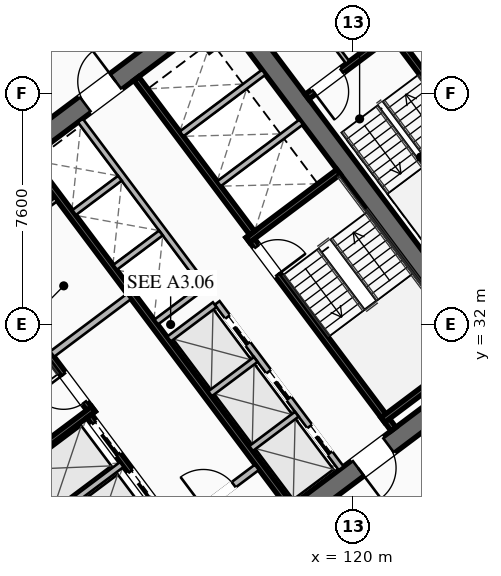
"""IFC4 building model, lengths in metres.
Left out: names, types, materials, properties, quantities, classifications, styles, units other than length and angle.
Written with IfcOpenShell. Run it as: python <this file> out.ifc"""

import sys

from ifc_helpers import new_model, si_unit, direction, frame, frame_2d, origin, place, context, subcontext, project, spatial, rectangle, extrude, element, fill, save


model = new_model("IFC4")
c1 = context("Model", 3, precision=1e-05, world=origin(), true_north=direction((0.0, 1.0)))
c2 = subcontext(c1, "Body", "Model", "MODEL_VIEW")
j1 = project(units=[si_unit("LENGTHUNIT", "METRE"), si_unit("PLANEANGLEUNIT", "RADIAN")], contexts=[c1])
p1 = place(None, origin())
s1 = spatial("IfcSite", under=j1, at=p1, CompositionType="ELEMENT")
p2 = place(p1, origin())
s2 = spatial("IfcBuilding", under=s1, at=p2, CompositionType="ELEMENT")
p3 = place(p2, frame((0.0, 0.0, 63.65)))
s3 = spatial("IfcBuildingStorey", under=s2, at=p3, CompositionType="ELEMENT", Elevation=63.65)
for number, where, z_axis, x_axis in (
    (1, (112.476, 21.107, 0.0), (0.0, 0.0, 1.0), (-0.6, 0.8, 0.0)),
    (2, (115.524, 42.893, 0.0), (0.0, 0.0, 1.0), (0.6, -0.8, 0.0)),
):
    element("IfcWall", number, at=place(p3, frame(where, z_axis=z_axis, x_axis=x_axis)), inside=s3, PredefinedType="SHEAR", context=c2, shape_type="SweptSolid", body=[
        extrude(rectangle(XDim=15.6, YDim=0.65, at=frame_2d((7.8, 0.0))), origin(), (0.0, 0.0, 1.0), 3.55),
    ])
p4 = place(p3, frame((124.429, 30.478, 0.0), z_axis=(0.0, 0.0, 1.0), x_axis=(-0.799998028465, -0.600002628705, 0.0)))
e3 = element("IfcWall", 3, at=p4, inside=s3, PredefinedType="SHEAR", context=c2, shape_type="SweptSolid", body=[
    extrude(rectangle(XDim=14.86, YDim=0.65, at=frame_2d((7.43, 0.0))), origin(), (0.0, 0.0, 1.0), 3.55),
])
p5 = place(p4, frame((9.13, 0.0, 0.0)))
e4 = element("IfcOpeningElement", 4, at=p5, cuts=e3, PredefinedType="OPENING", context=c2, shape_type="SweptSolid", body=[
    extrude(rectangle(XDim=1.25, YDim=2.25, at=frame_2d((0.625, 1.125))), frame((0.0, 0.335, 0.0), z_axis=(0.0, -1.0, 0.0), x_axis=(1.0, 0.0, 0.0)), (0.0, 0.0, 1.0), 0.67),
])
p6 = place(p4, frame((4.08, 0.0, 0.0)))
e5 = element("IfcOpeningElement", 5, at=p6, cuts=e3, PredefinedType="OPENING", context=c2, shape_type="SweptSolid", body=[
    extrude(rectangle(XDim=1.25, YDim=2.25, at=frame_2d((0.625, 1.125))), frame((0.0, 0.335, 0.0), z_axis=(0.0, -1.0, 0.0), x_axis=(1.0, 0.0, 0.0)), (0.0, 0.0, 1.0), 0.67),
])
p7 = place(p3, frame((103.571, 33.522, 0.0), z_axis=(0.0, 0.0, 1.0), x_axis=(0.799998028465, 0.600002628705, 0.0)))
e6 = element("IfcWall", 6, at=p7, inside=s3, PredefinedType="SHEAR", context=c2, shape_type="SweptSolid", body=[
    extrude(rectangle(XDim=14.86, YDim=0.65, at=frame_2d((7.43, 0.0))), origin(), (0.0, 0.0, 1.0), 3.55),
])
p8 = place(p7, frame((4.48, 0.0, 0.0)))
e7 = element("IfcOpeningElement", 7, at=p8, cuts=e6, PredefinedType="OPENING", context=c2, shape_type="SweptSolid", body=[
    extrude(rectangle(XDim=1.25, YDim=2.25, at=frame_2d((0.625, 1.125))), frame((0.0, 0.335, 0.0), z_axis=(0.0, -1.0, 0.0), x_axis=(1.0, 0.0, 0.0)), (0.0, 0.0, 1.0), 0.67),
])
p9 = place(p7, frame((9.53, 0.0, 0.0)))
e8 = element("IfcOpeningElement", 8, at=p9, cuts=e6, PredefinedType="OPENING", context=c2, shape_type="SweptSolid", body=[
    extrude(rectangle(XDim=1.25, YDim=2.25, at=frame_2d((0.625, 1.125))), frame((0.0, 0.335, 0.0), z_axis=(0.0, -1.0, 0.0), x_axis=(1.0, 0.0, 0.0)), (0.0, 0.0, 1.0), 0.67),
])
p10 = place(p3, frame((111.44, 29.08, 0.0), z_axis=(0.0, 0.0, 1.0), x_axis=(-0.600009827119, 0.799992629566, 0.0)))
e9 = element("IfcWall", 9, at=p10, inside=s3, PredefinedType="SHEAR", context=c2, shape_type="SweptSolid", body=[
    extrude(rectangle(XDim=7.95, YDim=0.2, at=frame_2d((3.975, 0.0))), origin(), (0.0, 0.0, 1.0), 3.35),
])
p11 = place(p10, frame((0.45, 0.0, 0.0)))
e10 = element("IfcOpeningElement", 10, at=p11, cuts=e9, PredefinedType="OPENING", context=c2, shape_type="SweptSolid", body=[
    extrude(rectangle(XDim=1.15, YDim=2.2, at=frame_2d((0.575, 1.1))), frame((0.0, 0.11, 0.0), z_axis=(0.0, -1.0, 0.0), x_axis=(1.0, 0.0, 0.0)), (0.0, 0.0, 1.0), 0.22),
])
p12 = place(p3, frame((108.476, 26.982, 0.0), z_axis=(0.0, 0.0, 1.0), x_axis=(0.799984290658, 0.600020945218, 0.0)))
e11 = element("IfcWall", 11, at=p12, inside=s3, PredefinedType="SHEAR", context=c2, shape_type="SweptSolid", body=[
    extrude(rectangle(XDim=3.73, YDim=0.2, at=frame_2d((1.865, 0.0))), origin(), (0.0, 0.0, 1.0), 3.35),
])
p13 = place(p3, frame((116.56, 34.92, 0.0), z_axis=(0.0, 0.0, 1.0), x_axis=(0.600009827119, -0.799992629566, 0.0)))
e12 = element("IfcWall", 12, at=p13, inside=s3, PredefinedType="SHEAR", context=c2, shape_type="SweptSolid", body=[
    extrude(rectangle(XDim=7.95, YDim=0.2, at=frame_2d((3.975, 0.0))), origin(), (0.0, 0.0, 1.0), 3.35),
])
p14 = place(p13, frame((0.45, 0.0, 0.0)))
e13 = element("IfcOpeningElement", 13, at=p14, cuts=e12, PredefinedType="OPENING", context=c2, shape_type="SweptSolid", body=[
    extrude(rectangle(XDim=1.15, YDim=2.2, at=frame_2d((0.575, 1.1))), frame((0.0, 0.11, 0.0), z_axis=(0.0, -1.0, 0.0), x_axis=(1.0, 0.0, 0.0)), (0.0, 0.0, 1.0), 0.22),
])
for number, where, z_axis, x_axis in (
    (14, (116.54, 34.78, 0.0), (0.0, 0.0, 1.0), (0.8, 0.6, 0.0)),
    (15, (120.98, 28.86, 0.0), (0.0, 0.0, 1.0), (0.8, 0.6, 0.0)),
):
    element("IfcWall", number, at=place(p3, frame(where, z_axis=z_axis, x_axis=x_axis)), inside=s3, PredefinedType="SHEAR", context=c2, shape_type="SweptSolid", body=[
        extrude(rectangle(XDim=3.73, YDim=0.2, at=frame_2d((1.865, 0.0))), origin(), (0.0, 0.0, 1.0), 3.35),
    ])
p15 = place(p3, frame((117.938, 26.016, 0.0), z_axis=(0.0, 0.0, 1.0), x_axis=(-0.600005463273, 0.799995902516, 0.0)))
e16 = element("IfcWall", 16, at=p15, inside=s3, PredefinedType="SHEAR", context=c2, shape_type="SweptSolid", body=[
    extrude(rectangle(XDim=14.3, YDim=0.2, at=frame_2d((7.15, 0.0))), origin(), (0.0, 0.0, 1.0), 3.35),
])
p16 = place(p3, frame((110.104, 31.028, 0.0), z_axis=(0.0, 0.0, 1.0), x_axis=(0.800018601094, 0.59997519774, 0.0)))
e17 = element("IfcWall", 17, at=p16, inside=s3, PredefinedType="SOLIDWALL", context=c2, shape_type="SweptSolid", body=[
    extrude(rectangle(XDim=3.15, YDim=0.22, at=frame_2d((1.575, 0.0))), origin(), (0.0, 0.0, 1.0), 2.493),
])
p17 = place(p3, frame((114.316, 25.412, 0.0), z_axis=(0.0, 0.0, 1.0), x_axis=(0.800018601094, 0.59997519774, 0.0)))
e18 = element("IfcWall", 18, at=p17, inside=s3, PredefinedType="SOLIDWALL", context=c2, shape_type="SweptSolid", body=[
    extrude(rectangle(XDim=3.15, YDim=0.22, at=frame_2d((1.575, 0.0))), origin(), (0.0, 0.0, 1.0), 2.493),
])
p18 = place(p17, frame((0.95, 0.0, 0.0)))
e19 = element("IfcOpeningElement", 19, at=p18, cuts=e18, PredefinedType="OPENING", context=c2, shape_type="SweptSolid", body=[
    extrude(rectangle(XDim=1.25, YDim=2.25, at=frame_2d((0.625, 1.125))), frame((0.0, 0.12, 0.0), z_axis=(0.0, -1.0, 0.0), x_axis=(1.0, 0.0, 0.0)), (0.0, 0.0, 1.0), 0.24),
])
p19 = place(p3, frame((115.13, 23.91, 0.0), z_axis=(0.0, 0.0, 1.0), x_axis=(-0.599975393228, 0.800018454488, 0.0)))
e20 = element("IfcWall", 20, at=p19, inside=s3, PredefinedType="SHEAR", context=c2, shape_type="SweptSolid", body=[
    extrude(rectangle(XDim=6.35, YDim=0.2, at=frame_2d((3.175, 0.0))), origin(), (0.0, 0.0, 1.0), 3.35),
])
p20 = place(p19, frame((4.775, 0.0, 0.0)))
e21 = element("IfcOpeningElement", 21, at=p20, cuts=e20, PredefinedType="OPENING", context=c2, shape_type="SweptSolid", body=[
    extrude(rectangle(XDim=1.3, YDim=2.25, at=frame_2d((0.65, 1.125))), frame((0.0, 0.11, 0.0), z_axis=(0.0, -1.0, 0.0), x_axis=(1.0, 0.0, 0.0)), (0.0, 0.0, 1.0), 0.22),
])
p21 = place(p19, frame((2.775, 0.0, 0.0)))
e22 = element("IfcOpeningElement", 22, at=p21, cuts=e20, PredefinedType="OPENING", context=c2, shape_type="SweptSolid", body=[
    extrude(rectangle(XDim=1.3, YDim=2.25, at=frame_2d((0.65, 1.125))), frame((0.0, 0.11, 0.0), z_axis=(0.0, -1.0, 0.0), x_axis=(1.0, 0.0, 0.0)), (0.0, 0.0, 1.0), 0.22),
])
p22 = place(p19, frame((0.575, 0.0, 0.0)))
e23 = element("IfcOpeningElement", 23, at=p22, cuts=e20, PredefinedType="OPENING", context=c2, shape_type="SweptSolid", body=[
    extrude(rectangle(XDim=1.3, YDim=2.25, at=frame_2d((0.65, 1.125))), frame((0.0, 0.11, 0.0), z_axis=(0.0, -1.0, 0.0), x_axis=(1.0, 0.0, 0.0)), (0.0, 0.0, 1.0), 0.22),
])
p23 = place(p3, frame((109.688, 25.366, 0.0), z_axis=(0.0, 0.0, 1.0), x_axis=(0.8, 0.6, 0.0)))
e24 = element("IfcWall", 24, at=p23, inside=s3, PredefinedType="SOLIDWALL", context=c2, shape_type="SweptSolid", body=[
    extrude(rectangle(XDim=3.38, YDim=0.2, at=frame_2d((1.69, 0.0))), origin(), (0.0, 0.0, 1.0), 3.35),
])
p24 = place(p3, frame((112.87, 40.09, 0.0), z_axis=(0.0, 0.0, 1.0), x_axis=(0.599975393228, -0.800018454488, 0.0)))
e25 = element("IfcWall", 25, at=p24, inside=s3, PredefinedType="SHEAR", context=c2, shape_type="SweptSolid", body=[
    extrude(rectangle(XDim=6.35, YDim=0.2, at=frame_2d((3.175, 0.0))), origin(), (0.0, 0.0, 1.0), 3.35),
])
for number, where, z_axis, x_axis in (
    (26, (115.59, 36.63, 0.0), (0.0, 0.0, 1.0), (0.8, 0.6, 0.0)),
    (27, (114.36, 38.27, 0.0), (0.0, 0.0, 1.0), (0.8, 0.6, 0.0)),
):
    element("IfcWall", number, at=place(p3, frame(where, z_axis=z_axis, x_axis=x_axis)), inside=s3, PredefinedType="SOLIDWALL", context=c2, shape_type="SweptSolid", body=[
        extrude(rectangle(XDim=3.38, YDim=0.2, at=frame_2d((1.69, 0.0))), origin(), (0.0, 0.0, 1.0), 3.35),
    ])
p25 = place(p3, frame((107.71, 34.22, 0.0), z_axis=(0.0, 0.0, 1.0), x_axis=(0.799981399002, 0.60002480053, 0.0)))
e28 = element("IfcWall", 28, at=p25, inside=s3, PredefinedType="PARTITIONING", context=c2, shape_type="SweptSolid", body=[
    extrude(rectangle(XDim=3.15, YDim=0.135, at=frame_2d((1.575, 0.0))), origin(), (0.0, 0.0, 1.0), 2.493),
])
p26 = place(p25, frame((1.05, 0.0, 0.0)))
e29 = element("IfcOpeningElement", 29, at=p26, cuts=e28, PredefinedType="OPENING", context=c2, shape_type="SweptSolid", body=[
    extrude(rectangle(XDim=1.05, YDim=2.2, at=frame_2d((0.525, 1.1))), frame((0.0, 0.077, 0.0), z_axis=(0.0, -1.0, 0.0), x_axis=(1.0, 0.0, 0.0)), (0.0, 0.0, 1.0), 0.155),
])
p27 = place(p3, frame((119.61, 27.27, 0.0), z_axis=(0.0, 0.0, 1.0), x_axis=(-0.600011488909, 0.79999138319, 0.0)))
e30 = element("IfcWall", 30, at=p27, inside=s3, PredefinedType="SOLIDWALL", context=c2, shape_type="SweptSolid", body=[
    extrude(rectangle(XDim=6.8, YDim=0.2, at=frame_2d((3.4, 0.0))), origin(), (0.0, 0.0, 1.0), 3.35),
])
p28 = place(p27, frame((0.625, 0.0, 0.0)))
e31 = element("IfcOpeningElement", 31, at=p28, cuts=e30, PredefinedType="OPENING", context=c2, shape_type="SweptSolid", body=[
    extrude(rectangle(XDim=1.1, YDim=2.2, at=frame_2d((0.55, 1.1))), frame((0.0, 0.11, 0.0), z_axis=(0.0, -1.0, 0.0), x_axis=(1.0, 0.0, 0.0)), (0.0, 0.0, 1.0), 0.22),
])
p29 = place(p27, frame((2.875, 0.0, 0.0)))
e32 = element("IfcOpeningElement", 32, at=p29, cuts=e30, PredefinedType="OPENING", context=c2, shape_type="SweptSolid", body=[
    extrude(rectangle(XDim=1.1, YDim=2.2, at=frame_2d((0.55, 1.1))), frame((0.0, 0.11, 0.0), z_axis=(0.0, -1.0, 0.0), x_axis=(1.0, 0.0, 0.0)), (0.0, 0.0, 1.0), 0.22),
])
p30 = place(p27, frame((5.125, 0.0, 0.0)))
e33 = element("IfcOpeningElement", 33, at=p30, cuts=e30, PredefinedType="OPENING", context=c2, shape_type="SweptSolid", body=[
    extrude(rectangle(XDim=1.1, YDim=2.2, at=frame_2d((0.55, 1.1))), frame((0.0, 0.11, 0.0), z_axis=(0.0, -1.0, 0.0), x_axis=(1.0, 0.0, 0.0)), (0.0, 0.0, 1.0), 0.22),
])
p31 = place(p3, frame((116.646, 27.922, 0.0), z_axis=(0.0, 0.0, 1.0), x_axis=(0.8, 0.6, 0.0)))
e34 = element("IfcWall", 34, at=p31, inside=s3, PredefinedType="SOLIDWALL", context=c2, shape_type="SweptSolid", body=[
    extrude(rectangle(XDim=1.88, YDim=0.2, at=frame_2d((0.94, 0.0))), origin(), (0.0, 0.0, 1.0), 3.35),
])
p32 = place(p3, frame((115.296, 29.722, 0.0), z_axis=(0.0, 0.0, 1.0), x_axis=(0.799984418148, 0.600020775241, 0.0)))
e35 = element("IfcWall", 35, at=p32, inside=s3, PredefinedType="SOLIDWALL", context=c2, shape_type="SweptSolid", body=[
    extrude(rectangle(XDim=1.88, YDim=0.2, at=frame_2d((0.94, 0.0))), origin(), (0.0, 0.0, 1.0), 3.35),
])
p33 = place(p3, frame((113.946, 31.522, 0.0), z_axis=(0.0, 0.0, 1.0), x_axis=(0.8, 0.6, 0.0)))
e36 = element("IfcWall", 36, at=p33, inside=s3, PredefinedType="SOLIDWALL", context=c2, shape_type="SweptSolid", body=[
    extrude(rectangle(XDim=1.88, YDim=0.2, at=frame_2d((0.94, 0.0))), origin(), (0.0, 0.0, 1.0), 3.35),
])
p34 = place(p3, frame((115.11, 33.27, 0.0), z_axis=(0.0, 0.0, 1.0), x_axis=(-0.600011488909, 0.79999138319, 0.0)))
e37 = element("IfcWall", 37, at=p34, inside=s3, PredefinedType="SOLIDWALL", context=c2, shape_type="SweptSolid", body=[
    extrude(rectangle(XDim=6.8, YDim=0.2, at=frame_2d((3.4, 0.0))), origin(), (0.0, 0.0, 1.0), 3.35),
])
p35 = place(p3, frame((113.526, 32.082, 0.0), z_axis=(0.0, 0.0, 1.0), x_axis=(0.800046745961, 0.599937666993, 0.0)))
e38 = element("IfcWall", 38, at=p35, inside=s3, PredefinedType="SOLIDWALL", context=c2, shape_type="SweptSolid", body=[
    extrude(rectangle(XDim=1.88, YDim=0.2, at=frame_2d((0.94, 0.0))), origin(), (0.0, 0.0, 1.0), 3.35),
])
p36 = place(p3, frame((112.176, 33.882, 0.0), z_axis=(0.0, 0.0, 1.0), x_axis=(0.8, 0.6, 0.0)))
e39 = element("IfcWall", 39, at=p36, inside=s3, PredefinedType="SOLIDWALL", context=c2, shape_type="SweptSolid", body=[
    extrude(rectangle(XDim=1.88, YDim=0.2, at=frame_2d((0.94, 0.0))), origin(), (0.0, 0.0, 1.0), 3.35),
])
p37 = place(p3, frame((110.826, 35.682, 0.0), z_axis=(0.0, 0.0, 1.0), x_axis=(0.799984418148, 0.600020775241, 0.0)))
e40 = element("IfcWall", 40, at=p37, inside=s3, PredefinedType="SOLIDWALL", context=c2, shape_type="SweptSolid", body=[
    extrude(rectangle(XDim=1.88, YDim=0.2, at=frame_2d((0.94, 0.0))), origin(), (0.0, 0.0, 1.0), 3.35),
])
p38 = place(p3, frame((125.304, 36.228, 0.0), z_axis=(0.0, 0.0, 1.0), x_axis=(-0.59998851072, 0.800008616831, 0.0)))
e41 = element("IfcWall", 41, at=p38, inside=s3, PredefinedType="SHEAR", context=c2, shape_type="SweptSolid", body=[
    extrude(rectangle(XDim=6.8, YDim=0.2, at=frame_2d((3.4, 0.0))), origin(), (0.0, 0.0, 1.0), 3.35),
])
p39 = place(p3, frame((121.204, 41.528, 0.0), z_axis=(0.0, 0.0, 1.0), x_axis=(-0.800017232136, -0.599977023131, 0.0)))
e42 = element("IfcWall", 42, at=p39, inside=s3, PredefinedType="SHEAR", context=c2, shape_type="SweptSolid", body=[
    extrude(rectangle(XDim=3.4, YDim=0.2, at=frame_2d((1.7, 0.0))), origin(), (0.0, 0.0, 1.0), 3.35),
])
p40 = place(p39, frame((1.975, 0.0, 0.0)))
e43 = element("IfcOpeningElement", 43, at=p40, cuts=e42, PredefinedType="OPENING", context=c2, shape_type="SweptSolid", body=[
    extrude(rectangle(XDim=1.15, YDim=2.2, at=frame_2d((0.575, 1.1))), frame((0.0, 0.11, 0.0), z_axis=(0.0, -1.0, 0.0), x_axis=(1.0, 0.0, 0.0)), (0.0, 0.0, 1.0), 0.22),
])
p41 = place(p3, frame((119.824, 40.618, 0.0), z_axis=(0.0, 0.0, 1.0), x_axis=(-0.599982243973, 0.800013316712, 0.0)))
e44 = element("IfcWall", 44, at=p41, inside=s3, PredefinedType="PARTITIONING", context=c2, shape_type="SweptSolid", body=[
    extrude(rectangle(XDim=4.4, YDim=0.135, at=frame_2d((2.2, 0.0))), origin(), (0.0, 0.0, 1.0), 2.493),
])
p42 = place(p3, frame((98.516, 34.012, 0.0), z_axis=(0.0, 0.0, 1.0), x_axis=(0.799998035726, 0.600002619023, 0.0)))
e45 = element("IfcWall", 45, at=p42, inside=s3, PredefinedType="PARTITIONING", context=c2, shape_type="SweptSolid", body=[
    extrude(rectangle(XDim=29.83, YDim=0.135, at=frame_2d((14.915, 0.0))), origin(), (0.0, 0.0, 1.0), 2.493),
])
p43 = place(p42, frame((1.587, 0.0, 0.0)))
e46 = element("IfcOpeningElement", 46, at=p43, cuts=e45, PredefinedType="OPENING", context=c2, shape_type="SweptSolid", body=[
    extrude(rectangle(XDim=0.95, YDim=2.05, at=frame_2d((0.475, 1.025))), frame((0.0, 0.077, 0.0), z_axis=(0.0, -1.0, 0.0), x_axis=(1.0, 0.0, 0.0)), (0.0, 0.0, 1.0), 0.155),
])
p44 = place(p42, frame((28.58, 0.0, 0.0)))
e47 = element("IfcOpeningElement", 47, at=p44, cuts=e45, PredefinedType="OPENING", context=c2, shape_type="SweptSolid", body=[
    extrude(rectangle(XDim=0.95, YDim=2.05, at=frame_2d((0.475, 1.025))), frame((0.0, 0.077, 0.0), z_axis=(0.0, -1.0, 0.0), x_axis=(1.0, 0.0, 0.0)), (0.0, 0.0, 1.0), 0.155),
])
p45 = place(p3, frame((135.46, 34.47, 0.0), z_axis=(0.0, 0.0, 1.0), x_axis=(-0.800000982127, -0.599998690494, 0.0)))
e48 = element("IfcWall", 48, at=p45, inside=s3, PredefinedType="PARTITIONING", context=c2, shape_type="SweptSolid", body=[
    extrude(rectangle(XDim=29.83, YDim=0.135, at=frame_2d((14.915, 0.0))), origin(), (0.0, 0.0, 1.0), 2.493),
])
p46 = place(p45, frame((27.431, 0.0, 0.0)))
e49 = element("IfcOpeningElement", 49, at=p46, cuts=e48, PredefinedType="OPENING", context=c2, shape_type="SweptSolid", body=[
    extrude(rectangle(XDim=0.95, YDim=2.05, at=frame_2d((0.475, 1.025))), frame((0.0, 0.077, 0.0), z_axis=(0.0, -1.0, 0.0), x_axis=(1.0, 0.0, 0.0)), (0.0, 0.0, 1.0), 0.155),
])
p47 = place(p45, frame((18.43, 0.0, 0.0)))
e50 = element("IfcOpeningElement", 50, at=p47, cuts=e48, PredefinedType="OPENING", context=c2, shape_type="SweptSolid", body=[
    extrude(rectangle(XDim=0.95, YDim=2.05, at=frame_2d((0.475, 1.025))), frame((0.0, 0.077, 0.0), z_axis=(0.0, -1.0, 0.0), x_axis=(1.0, 0.0, 0.0)), (0.0, 0.0, 1.0), 0.155),
])
p48 = place(p45, frame((0.38, 0.0, 0.0)))
e51 = element("IfcOpeningElement", 51, at=p48, cuts=e48, PredefinedType="OPENING", context=c2, shape_type="SweptSolid", body=[
    extrude(rectangle(XDim=0.95, YDim=2.05, at=frame_2d((0.475, 1.025))), frame((0.0, 0.077, 0.0), z_axis=(0.0, -1.0, 0.0), x_axis=(1.0, 0.0, 0.0)), (0.0, 0.0, 1.0), 0.155),
])
p49 = place(p3, frame((111.548, 16.636, 0.0), z_axis=(0.0, 0.0, 1.0), x_axis=(-0.600003610192, 0.799997292343, 0.0)))
e52 = element("IfcWall", 52, at=p49, inside=s3, PredefinedType="PARTITIONING", context=c2, shape_type="SweptSolid", body=[
    extrude(rectangle(XDim=21.64, YDim=0.135, at=frame_2d((10.82, 0.0))), origin(), (0.0, 0.0, 1.0), 2.493),
])
p50 = place(p49, frame((10.596, 0.0, 0.0)))
e53 = element("IfcOpeningElement", 53, at=p50, cuts=e52, PredefinedType="OPENING", context=c2, shape_type="SweptSolid", body=[
    extrude(rectangle(XDim=0.95, YDim=2.05, at=frame_2d((0.475, 1.025))), frame((0.0, 0.077, 0.0), z_axis=(0.0, -1.0, 0.0), x_axis=(1.0, 0.0, 0.0)), (0.0, 0.0, 1.0), 0.155),
])
p51 = place(p9, origin())
e54 = element("IfcDoor", 54, at=p51, inside=s3, OperationType="SINGLE_SWING_RIGHT", PredefinedType="DOOR", context=c2, shape_type="SweptSolid", body=[
    extrude(rectangle(XDim=1.25, YDim=2.25, at=frame_2d((0.625, 1.125))), frame((0.0, 0.025, 0.0), z_axis=(0.0, -1.0, 0.0), x_axis=(1.0, 0.0, 0.0)), (0.0, 0.0, 1.0), 0.05),
])
fill(e8, e54)
p52 = place(p6, origin())
e55 = element("IfcDoor", 55, at=p52, inside=s3, OperationType="SINGLE_SWING_RIGHT", PredefinedType="DOOR", context=c2, shape_type="SweptSolid", body=[
    extrude(rectangle(XDim=1.25, YDim=2.25, at=frame_2d((0.625, 1.125))), frame((0.0, 0.025, 0.0), z_axis=(0.0, -1.0, 0.0), x_axis=(1.0, 0.0, 0.0)), (0.0, 0.0, 1.0), 0.05),
])
fill(e5, e55)
p53 = place(p11, origin())
e56 = element("IfcDoor", 56, at=p53, inside=s3, OperationType="SINGLE_SWING_RIGHT", PredefinedType="DOOR", context=c2, shape_type="SweptSolid", body=[
    extrude(rectangle(XDim=1.15, YDim=2.2, at=frame_2d((0.575, 1.1))), frame((0.0, 0.025, 0.0), z_axis=(0.0, -1.0, 0.0), x_axis=(1.0, 0.0, 0.0)), (0.0, 0.0, 1.0), 0.05),
])
fill(e10, e56)
p54 = place(p14, origin())
e57 = element("IfcDoor", 57, at=p54, inside=s3, OperationType="SINGLE_SWING_RIGHT", PredefinedType="DOOR", context=c2, shape_type="SweptSolid", body=[
    extrude(rectangle(XDim=1.15, YDim=2.2, at=frame_2d((0.575, 1.1))), frame((0.0, 0.025, 0.0), z_axis=(0.0, -1.0, 0.0), x_axis=(1.0, 0.0, 0.0)), (0.0, 0.0, 1.0), 0.05),
])
fill(e13, e57)
p55 = place(p18, origin())
e58 = element("IfcDoor", 58, at=p55, inside=s3, OperationType="SINGLE_SWING_LEFT", PredefinedType="DOOR", context=c2, shape_type="SweptSolid", body=[
    extrude(rectangle(XDim=1.25, YDim=2.25, at=frame_2d((0.625, 1.125))), frame((0.0, 0.025, 0.0), z_axis=(0.0, -1.0, 0.0), x_axis=(1.0, 0.0, 0.0)), (0.0, 0.0, 1.0), 0.05),
])
fill(e19, e58)
p56 = place(p40, origin())
e59 = element("IfcDoor", 59, at=p56, inside=s3, OperationType="SINGLE_SWING_RIGHT", PredefinedType="DOOR", context=c2, shape_type="SweptSolid", body=[
    extrude(rectangle(XDim=1.15, YDim=2.2, at=frame_2d((0.575, 1.1))), frame((0.0, 0.025, 0.0), z_axis=(0.0, -1.0, 0.0), x_axis=(1.0, 0.0, 0.0)), (0.0, 0.0, 1.0), 0.05),
])
fill(e43, e59)
p57 = place(p20, origin())
e60 = element("IfcDoor", 60, at=p57, inside=s3, OperationType="SLIDING_TO_LEFT", PredefinedType="DOOR", context=c2, shape_type="SweptSolid", body=[
    extrude(rectangle(XDim=1.3, YDim=2.25, at=frame_2d((0.65, 1.125))), frame((0.0, 0.025, 0.0), z_axis=(0.0, -1.0, 0.0), x_axis=(1.0, 0.0, 0.0)), (0.0, 0.0, 1.0), 0.05),
])
fill(e21, e60)
p58 = place(p21, origin())
e61 = element("IfcDoor", 61, at=p58, inside=s3, OperationType="SLIDING_TO_LEFT", PredefinedType="DOOR", context=c2, shape_type="SweptSolid", body=[
    extrude(rectangle(XDim=1.3, YDim=2.25, at=frame_2d((0.65, 1.125))), frame((0.0, 0.025, 0.0), z_axis=(0.0, -1.0, 0.0), x_axis=(1.0, 0.0, 0.0)), (0.0, 0.0, 1.0), 0.05),
])
fill(e22, e61)
p59 = place(p28, origin())
e62 = element("IfcDoor", 62, at=p59, inside=s3, OperationType="SLIDING_TO_LEFT", PredefinedType="DOOR", context=c2, shape_type="SweptSolid", body=[
    extrude(rectangle(XDim=1.1, YDim=2.2, at=frame_2d((0.55, 1.1))), frame((0.0, 0.025, 0.0), z_axis=(0.0, -1.0, 0.0), x_axis=(1.0, 0.0, 0.0)), (0.0, 0.0, 1.0), 0.05),
])
fill(e31, e62)
p60 = place(p29, origin())
e63 = element("IfcDoor", 63, at=p60, inside=s3, OperationType="SLIDING_TO_LEFT", PredefinedType="DOOR", context=c2, shape_type="SweptSolid", body=[
    extrude(rectangle(XDim=1.1, YDim=2.2, at=frame_2d((0.55, 1.1))), frame((0.0, 0.025, 0.0), z_axis=(0.0, -1.0, 0.0), x_axis=(1.0, 0.0, 0.0)), (0.0, 0.0, 1.0), 0.05),
])
fill(e32, e63)
p61 = place(p30, origin())
e64 = element("IfcDoor", 64, at=p61, inside=s3, OperationType="SLIDING_TO_LEFT", PredefinedType="DOOR", context=c2, shape_type="SweptSolid", body=[
    extrude(rectangle(XDim=1.1, YDim=2.2, at=frame_2d((0.55, 1.1))), frame((0.0, 0.025, 0.0), z_axis=(0.0, -1.0, 0.0), x_axis=(1.0, 0.0, 0.0)), (0.0, 0.0, 1.0), 0.05),
])
fill(e33, e64)
save(model, sys.argv[1])
